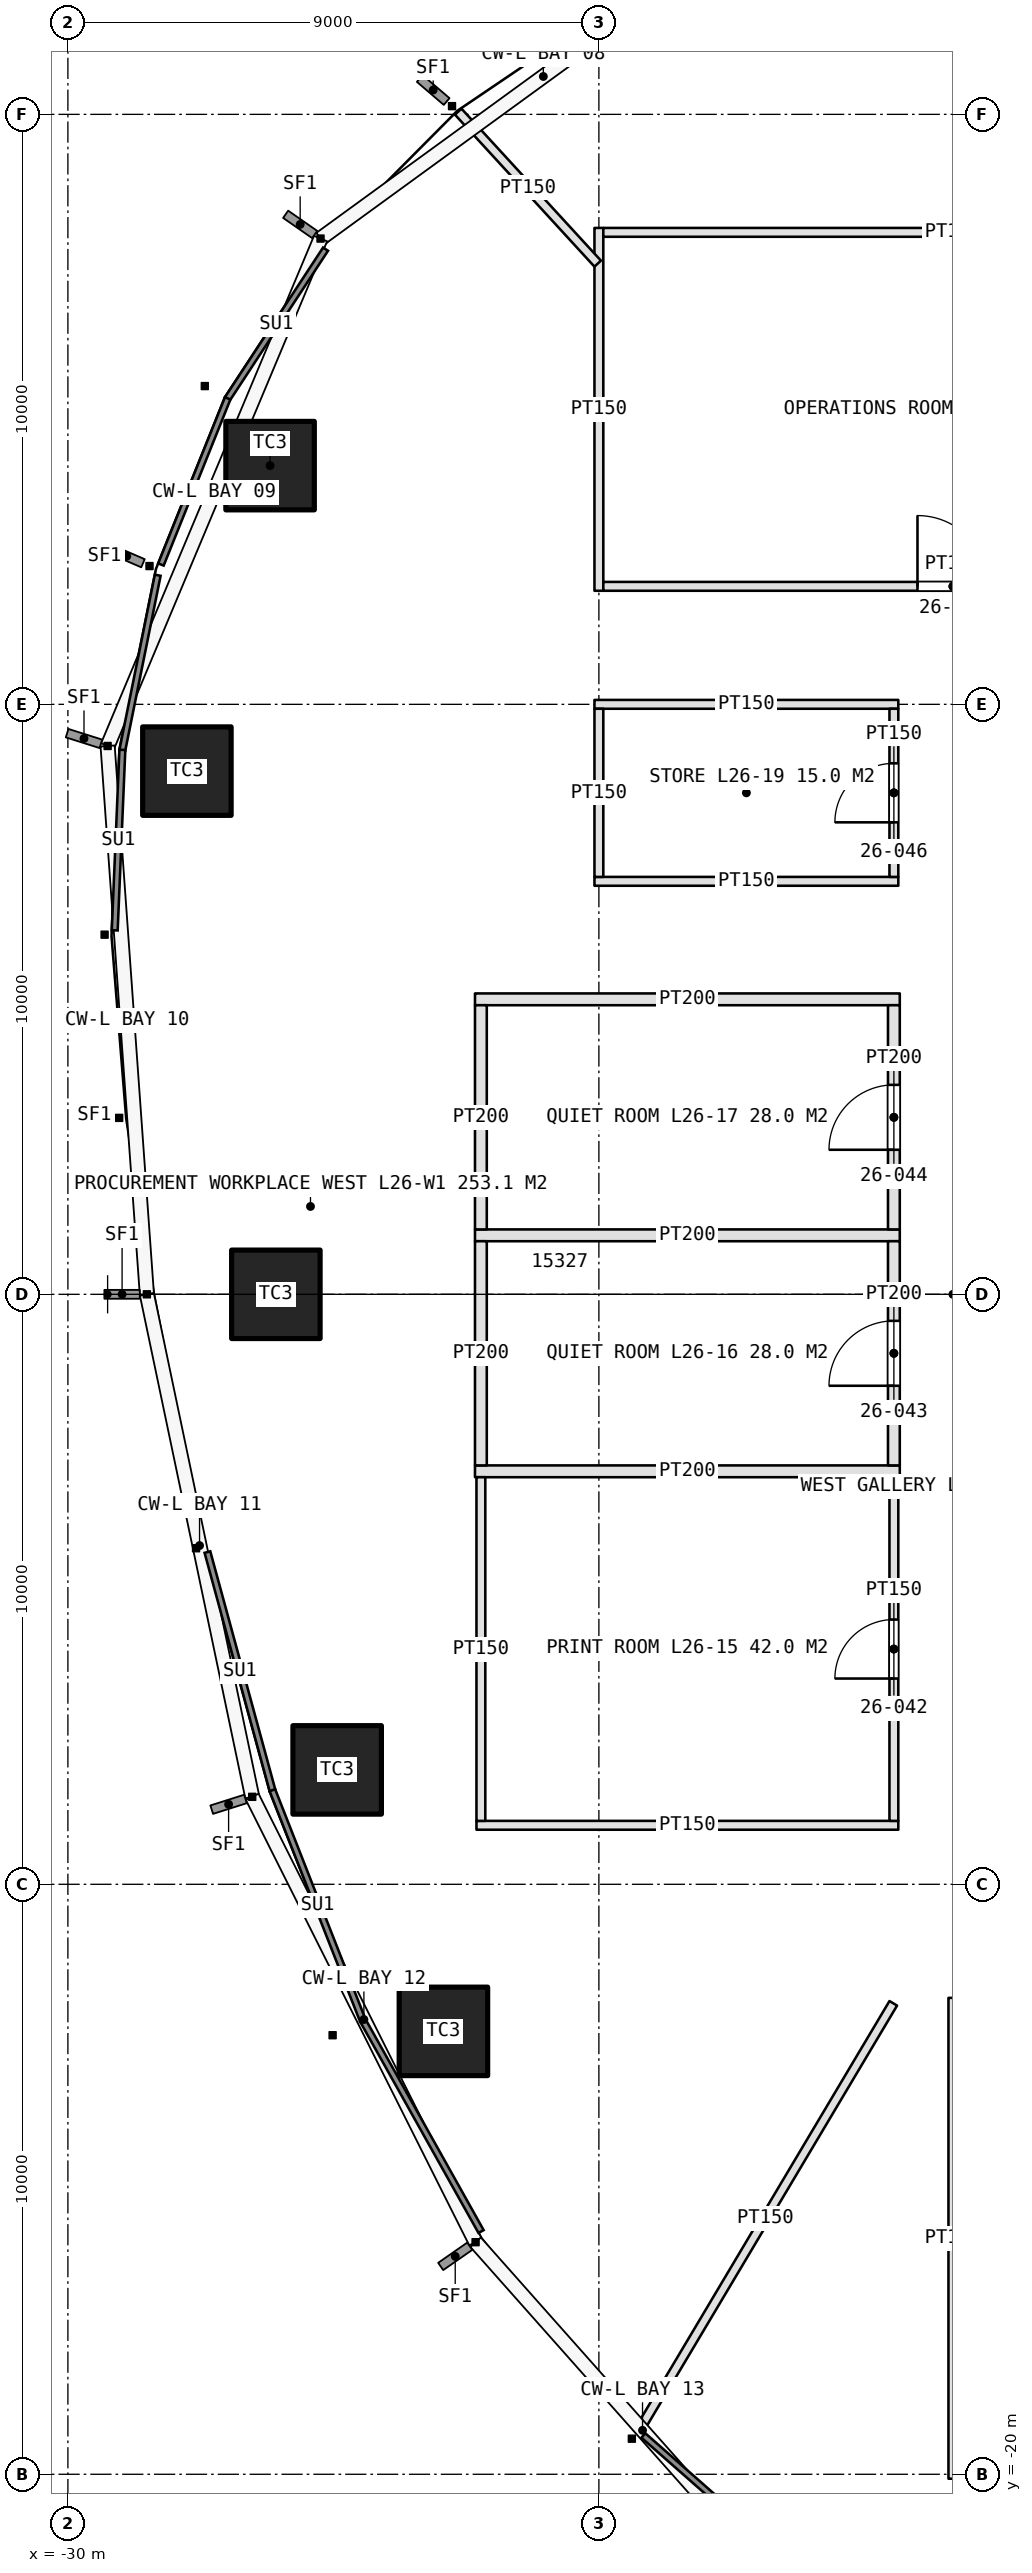
"""IFC4 building model, lengths in metres.
Left out: names, types, materials, properties, quantities, classifications, styles, units other than length and angle.
Written with IfcOpenShell. Run it as: python <this file> out.ifc"""

import sys

from ifc_helpers import new_model, si_unit, direction, frame, frame_2d, origin, origin_2d, place, context, subcontext, project, spatial, rectangle, extrude, element, fill, save


model = new_model("IFC4")
c1 = context("Model", 3, precision=1e-05, world=origin(), true_north=direction((0.0, 1.0)))
c2 = subcontext(c1, "Body", "Model", "MODEL_VIEW")
j1 = project(units=[si_unit("LENGTHUNIT", "METRE"), si_unit("PLANEANGLEUNIT", "RADIAN")], contexts=[c1])
p1 = place(None, origin())
s1 = spatial("IfcSite", under=j1, at=p1, CompositionType="ELEMENT")
p2 = place(p1, origin())
s2 = spatial("IfcBuilding", under=s1, at=p2, CompositionType="ELEMENT")
p3 = place(p2, frame((0.0, 0.0, 126.0)))
s3 = spatial("IfcBuildingStorey", under=s2, at=p3, CompositionType="ELEMENT", Elevation=126.0)
for number, where, z_axis, x_axis in (
    (1, (-26.573, 14.046, 0.0), (0.0, 0.0, 1.0), (1.0, 0.0, 0.0)),
    (2, (-27.983, 8.868, 0.0), (0.0, 0.0, 1.0), (1.0, 0.0, 0.0)),
    (3, (-26.475, 0.0, 0.0), (0.0, 0.0, 1.0), (1.0, 0.0, 0.0)),
    (4, (-25.436, -8.061, 0.0), (0.0, 0.0, 1.0), (1.0, 0.0, 0.0)),
    (5, (-23.635, -12.493, 0.0), (0.0, 0.0, 1.0), (1.0, 0.0, 0.0)),
):
    element("IfcColumn", number, at=place(p3, frame(where, z_axis=z_axis, x_axis=x_axis)), inside=s3, PredefinedType="COLUMN", context=c2, shape_type="SweptSolid", body=[
        extrude(rectangle(XDim=1.5, YDim=1.5, at=origin_2d()), origin(), (0.0, 0.0, 1.0), 4.2),
    ])
p4 = place(p3, frame((-21.0, 11.925, 0.0), z_axis=(0.0, 0.0, 1.0), x_axis=(0.0, 1.0, 0.0)))
e6 = element("IfcWall", 6, at=p4, inside=s3, PredefinedType="PARTITIONING", context=c2, shape_type="SweptSolid", body=[
    extrude(rectangle(XDim=6.15, YDim=0.15, at=frame_2d((3.075, 0.0))), origin(), (0.0, 0.0, 1.0), 3.0),
])
p5 = place(p3, frame((-20.925, 12.0, 0.0), z_axis=(0.0, 0.0, 1.0), x_axis=(1.0, 0.0, 0.0)))
e7 = element("IfcWall", 7, at=p5, inside=s3, PredefinedType="PARTITIONING", context=c2, shape_type="SweptSolid", body=[
    extrude(rectangle(XDim=11.85, YDim=0.15, at=frame_2d((5.925, 0.0))), origin(), (0.0, 0.0, 1.0), 3.0),
])
p6 = place(p5, frame((5.325, 0.0, 0.0)))
e8 = element("IfcOpeningElement", 8, at=p6, cuts=e7, PredefinedType="OPENING", context=c2, shape_type="SweptSolid", body=[
    extrude(rectangle(XDim=1.2, YDim=2.4, at=frame_2d((0.6, 1.2))), frame((0.0, 0.085, 0.0), z_axis=(0.0, -1.0, 0.0), x_axis=(1.0, 0.0, 0.0)), (0.0, 0.0, 1.0), 0.17),
])
p7 = place(p3, frame((-20.925, 18.0, 0.0), z_axis=(0.0, 0.0, 1.0), x_axis=(1.0, 0.0, 0.0)))
e9 = element("IfcWall", 9, at=p7, inside=s3, PredefinedType="PARTITIONING", context=c2, shape_type="SweptSolid", body=[
    extrude(rectangle(XDim=11.85, YDim=0.15, at=frame_2d((5.925, 0.0))), origin(), (0.0, 0.0, 1.0), 3.0),
])
p8 = place(p3, frame((-15.0, -11.925, 0.0), z_axis=(0.0, 0.0, 1.0), x_axis=(0.0, -1.0, 0.0)))
e10 = element("IfcWall", 10, at=p8, inside=s3, PredefinedType="PARTITIONING", context=c2, shape_type="SweptSolid", body=[
    extrude(rectangle(XDim=8.15, YDim=0.15, at=frame_2d((4.075, 0.0))), origin(), (0.0, 0.0, 1.0), 3.0),
])
p9 = place(p3, frame((-15.925, -9.0, 0.0), z_axis=(0.0, 0.0, 1.0), x_axis=(-1.0, 0.0, 0.0)))
e11 = element("IfcWall", 11, at=p9, inside=s3, PredefinedType="PARTITIONING", context=c2, shape_type="SweptSolid", body=[
    extrude(rectangle(XDim=7.15, YDim=0.15, at=frame_2d((3.575, 0.0))), origin(), (0.0, 0.0, 1.0), 3.0),
])
for number, where, z_axis, x_axis in (
    (12, (-15.9, -3.0, 0.0), (0.0, 0.0, 1.0), (-1.0, 0.0, 0.0)),
    (13, (-15.9, 1.0, 0.0), (0.0, 0.0, 1.0), (-1.0, 0.0, 0.0)),
    (14, (-15.9, 5.0, 0.0), (0.0, 0.0, 1.0), (-1.0, 0.0, 0.0)),
):
    element("IfcWall", number, at=place(p3, frame(where, z_axis=z_axis, x_axis=x_axis)), inside=s3, PredefinedType="PARTITIONING", context=c2, shape_type="SweptSolid", body=[
        extrude(rectangle(XDim=7.2, YDim=0.2, at=frame_2d((3.6, 0.0))), origin(), (0.0, 0.0, 1.0), 3.0),
    ])
p10 = place(p3, frame((-16.0, -8.925, 0.0), z_axis=(0.0, 0.0, 1.0), x_axis=(0.0, 1.0, 0.0)))
e15 = element("IfcWall", 15, at=p10, inside=s3, PredefinedType="PARTITIONING", context=c2, shape_type="SweptSolid", body=[
    extrude(rectangle(XDim=5.825, YDim=0.15, at=frame_2d((2.913, 0.0))), origin(), (0.0, 0.0, 1.0), 3.0),
])
p11 = place(p10, frame((2.413, 0.0, 0.0)))
e16 = element("IfcOpeningElement", 16, at=p11, cuts=e15, PredefinedType="OPENING", context=c2, shape_type="SweptSolid", body=[
    extrude(rectangle(XDim=1.0, YDim=2.2, at=frame_2d((0.5, 1.1))), frame((0.0, 0.085, 0.0), z_axis=(0.0, -1.0, 0.0), x_axis=(1.0, 0.0, 0.0)), (0.0, 0.0, 1.0), 0.17),
])
p12 = place(p3, frame((-23.0, -8.925, 0.0), z_axis=(0.0, 0.0, 1.0), x_axis=(0.0, 1.0, 0.0)))
e17 = element("IfcWall", 17, at=p12, inside=s3, PredefinedType="PARTITIONING", context=c2, shape_type="SweptSolid", body=[
    extrude(rectangle(XDim=5.825, YDim=0.15, at=frame_2d((2.913, 0.0))), origin(), (0.0, 0.0, 1.0), 3.0),
])
p13 = place(p3, frame((-16.0, -2.9, 0.0), z_axis=(0.0, 0.0, 1.0), x_axis=(0.0, 1.0, 0.0)))
e18 = element("IfcWall", 18, at=p13, inside=s3, PredefinedType="PARTITIONING", context=c2, shape_type="SweptSolid", body=[
    extrude(rectangle(XDim=3.8, YDim=0.2, at=frame_2d((1.9, 0.0))), origin(), (0.0, 0.0, 1.0), 3.0),
])
p14 = place(p13, frame((1.35, 0.0, 0.0)))
e19 = element("IfcOpeningElement", 19, at=p14, cuts=e18, PredefinedType="OPENING", context=c2, shape_type="SweptSolid", body=[
    extrude(rectangle(XDim=1.1, YDim=2.3, at=frame_2d((0.55, 1.15))), frame((0.0, 0.11, 0.0), z_axis=(0.0, -1.0, 0.0), x_axis=(1.0, 0.0, 0.0)), (0.0, 0.0, 1.0), 0.22),
])
p15 = place(p3, frame((-23.0, -2.9, 0.0), z_axis=(0.0, 0.0, 1.0), x_axis=(0.0, 1.0, 0.0)))
e20 = element("IfcWall", 20, at=p15, inside=s3, PredefinedType="PARTITIONING", context=c2, shape_type="SweptSolid", body=[
    extrude(rectangle(XDim=3.8, YDim=0.2, at=frame_2d((1.9, 0.0))), origin(), (0.0, 0.0, 1.0), 3.0),
])
p16 = place(p3, frame((-16.0, 1.1, 0.0), z_axis=(0.0, 0.0, 1.0), x_axis=(0.0, 1.0, 0.0)))
e21 = element("IfcWall", 21, at=p16, inside=s3, PredefinedType="PARTITIONING", context=c2, shape_type="SweptSolid", body=[
    extrude(rectangle(XDim=3.8, YDim=0.2, at=frame_2d((1.9, 0.0))), origin(), (0.0, 0.0, 1.0), 3.0),
])
p17 = place(p16, frame((1.35, 0.0, 0.0)))
e22 = element("IfcOpeningElement", 22, at=p17, cuts=e21, PredefinedType="OPENING", context=c2, shape_type="SweptSolid", body=[
    extrude(rectangle(XDim=1.1, YDim=2.3, at=frame_2d((0.55, 1.15))), frame((0.0, 0.11, 0.0), z_axis=(0.0, -1.0, 0.0), x_axis=(1.0, 0.0, 0.0)), (0.0, 0.0, 1.0), 0.22),
])
p18 = place(p3, frame((-23.0, 1.1, 0.0), z_axis=(0.0, 0.0, 1.0), x_axis=(0.0, 1.0, 0.0)))
e23 = element("IfcWall", 23, at=p18, inside=s3, PredefinedType="PARTITIONING", context=c2, shape_type="SweptSolid", body=[
    extrude(rectangle(XDim=3.8, YDim=0.2, at=frame_2d((1.9, 0.0))), origin(), (0.0, 0.0, 1.0), 3.0),
])
for number, where, z_axis, x_axis in (
    (24, (-15.925, 7.0, 0.0), (0.0, 0.0, 1.0), (-1.0, 0.0, 0.0)),
    (25, (-15.925, 10.0, 0.0), (0.0, 0.0, 1.0), (-1.0, 0.0, 0.0)),
):
    element("IfcWall", number, at=place(p3, frame(where, z_axis=z_axis, x_axis=x_axis)), inside=s3, PredefinedType="PARTITIONING", context=c2, shape_type="SweptSolid", body=[
        extrude(rectangle(XDim=5.15, YDim=0.15, at=frame_2d((2.575, 0.0))), origin(), (0.0, 0.0, 1.0), 3.0),
    ])
p19 = place(p3, frame((-16.0, 7.075, 0.0), z_axis=(0.0, 0.0, 1.0), x_axis=(0.0, 1.0, 0.0)))
e26 = element("IfcWall", 26, at=p19, inside=s3, PredefinedType="PARTITIONING", context=c2, shape_type="SweptSolid", body=[
    extrude(rectangle(XDim=2.85, YDim=0.15, at=frame_2d((1.425, 0.0))), origin(), (0.0, 0.0, 1.0), 3.0),
])
p20 = place(p19, frame((0.925, 0.0, 0.0)))
e27 = element("IfcOpeningElement", 27, at=p20, cuts=e26, PredefinedType="OPENING", context=c2, shape_type="SweptSolid", body=[
    extrude(rectangle(XDim=1.0, YDim=2.2, at=frame_2d((0.5, 1.1))), frame((0.0, 0.085, 0.0), z_axis=(0.0, -1.0, 0.0), x_axis=(1.0, 0.0, 0.0)), (0.0, 0.0, 1.0), 0.17),
])
p21 = place(p3, frame((-21.0, 7.075, 0.0), z_axis=(0.0, 0.0, 1.0), x_axis=(0.0, 1.0, 0.0)))
e28 = element("IfcWall", 28, at=p21, inside=s3, PredefinedType="PARTITIONING", context=c2, shape_type="SweptSolid", body=[
    extrude(rectangle(XDim=2.85, YDim=0.15, at=frame_2d((1.425, 0.0))), origin(), (0.0, 0.0, 1.0), 3.0),
])
p22 = place(p3, frame((-16.01, -12.017, 0.0), z_axis=(0.0, 0.0, 1.0), x_axis=(-0.511508688443, -0.85927810495, 0.0)))
e29 = element("IfcWall", 29, at=p22, inside=s3, PredefinedType="PARTITIONING", context=c2, shape_type="SweptSolid", body=[
    extrude(rectangle(XDim=8.47, YDim=0.15, at=frame_2d((4.235, 0.0))), origin(), (0.0, 0.0, 1.0), 3.0),
])
p23 = place(p3, frame((-21.02, 17.47, 0.0), z_axis=(0.0, 0.0, 1.0), x_axis=(-0.67615762792, 0.736756989927, 0.0)))
e30 = element("IfcWall", 30, at=p23, inside=s3, PredefinedType="PARTITIONING", context=c2, shape_type="SweptSolid", body=[
    extrude(rectangle(XDim=3.497, YDim=0.15, at=frame_2d((1.749, 0.0))), origin(), (0.0, 0.0, 1.0), 3.0),
])
p24 = place(p6, origin())
e31 = element("IfcDoor", 31, at=p24, inside=s3, OperationType="SINGLE_SWING_LEFT", PredefinedType="DOOR", context=c2, shape_type="SweptSolid", body=[
    extrude(rectangle(XDim=1.2, YDim=2.4, at=frame_2d((0.6, 1.2))), frame((0.0, 0.025, 0.0), z_axis=(0.0, -1.0, 0.0), x_axis=(1.0, 0.0, 0.0)), (0.0, 0.0, 1.0), 0.05),
])
fill(e8, e31)
p25 = place(p11, origin())
e32 = element("IfcDoor", 32, at=p25, inside=s3, OperationType="SINGLE_SWING_LEFT", PredefinedType="DOOR", context=c2, shape_type="SweptSolid", body=[
    extrude(rectangle(XDim=1.0, YDim=2.2, at=frame_2d((0.5, 1.1))), frame((0.0, 0.025, 0.0), z_axis=(0.0, -1.0, 0.0), x_axis=(1.0, 0.0, 0.0)), (0.0, 0.0, 1.0), 0.05),
])
fill(e16, e32)
p26 = place(p14, origin())
e33 = element("IfcDoor", 33, at=p26, inside=s3, OperationType="SINGLE_SWING_LEFT", PredefinedType="DOOR", context=c2, shape_type="SweptSolid", body=[
    extrude(rectangle(XDim=1.1, YDim=2.3, at=frame_2d((0.55, 1.15))), frame((0.0, 0.025, 0.0), z_axis=(0.0, -1.0, 0.0), x_axis=(1.0, 0.0, 0.0)), (0.0, 0.0, 1.0), 0.05),
])
fill(e19, e33)
p27 = place(p17, origin())
e34 = element("IfcDoor", 34, at=p27, inside=s3, OperationType="SINGLE_SWING_LEFT", PredefinedType="DOOR", context=c2, shape_type="SweptSolid", body=[
    extrude(rectangle(XDim=1.1, YDim=2.3, at=frame_2d((0.55, 1.15))), frame((0.0, 0.025, 0.0), z_axis=(0.0, -1.0, 0.0), x_axis=(1.0, 0.0, 0.0)), (0.0, 0.0, 1.0), 0.05),
])
fill(e22, e34)
p28 = place(p20, origin())
e35 = element("IfcDoor", 35, at=p28, inside=s3, OperationType="SINGLE_SWING_LEFT", PredefinedType="DOOR", context=c2, shape_type="SweptSolid", body=[
    extrude(rectangle(XDim=1.0, YDim=2.2, at=frame_2d((0.5, 1.1))), frame((0.0, 0.025, 0.0), z_axis=(0.0, -1.0, 0.0), x_axis=(1.0, 0.0, 0.0)), (0.0, 0.0, 1.0), 0.05),
])
fill(e27, e35)
save(model, sys.argv[1])
